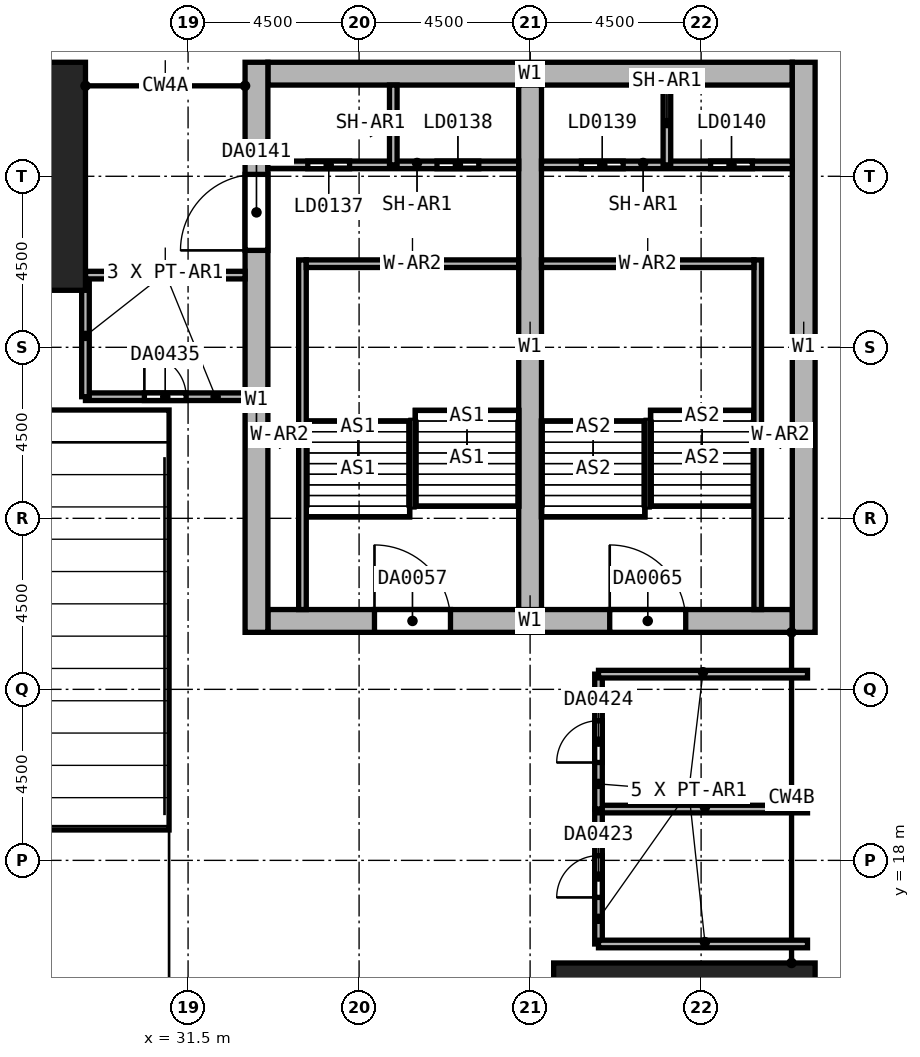
"""IFC4 building model, lengths in metres.
Left out: names, types, materials, properties, quantities, classifications, styles, units other than length and angle.
Written with IfcOpenShell. Run it as: python <this file> out.ifc"""

import sys

from ifc_helpers import new_model, si_unit, direction, frame, frame_2d, origin, origin_2d, place, context, subcontext, project, spatial, rectangle, extrude, element, fill, save


model = new_model("IFC4")
c1 = context("Model", 3, precision=1e-05, world=origin(), true_north=direction((0.0, 1.0)))
c2 = subcontext(c1, "Body", "Model", "MODEL_VIEW")
j1 = project(units=[si_unit("LENGTHUNIT", "METRE"), si_unit("PLANEANGLEUNIT", "RADIAN")], contexts=[c1])
p1 = place(None, origin())
s1 = spatial("IfcSite", under=j1, at=p1, CompositionType="ELEMENT")
p2 = place(p1, origin())
s2 = spatial("IfcBuilding", under=s1, at=p2, CompositionType="ELEMENT")
p3 = place(p2, frame((0.0, 0.0, 31.0)))
s3 = spatial("IfcBuildingStorey", under=s2, at=p3, CompositionType="ELEMENT", Elevation=31.0)
p4 = place(p3, frame((27.0, 36.0, 0.0), z_axis=(0.0, 0.0, 1.0), x_axis=(1.0, 0.0, 0.0)))
e1 = element("IfcColumn", 1, at=p4, inside=s3, PredefinedType="COLUMN", context=c2, shape_type="SweptSolid", body=[
    extrude(rectangle(XDim=3.6, YDim=6.0, at=origin_2d()), origin(), (0.0, 0.0, 1.0), 6.0),
])
p5 = place(p3, frame((44.56, 13.5, 0.0), z_axis=(0.0, 0.0, 1.0), x_axis=(0.0, 1.0, 0.0)))
e2 = element("IfcColumn", 2, at=p5, inside=s3, PredefinedType="COLUMN", context=c2, shape_type="SweptSolid", body=[
    extrude(rectangle(XDim=3.6, YDim=6.88, at=origin_2d()), origin(), (0.0, 0.0, 1.0), 6.0),
])
p6 = place(p3, frame((33.6, 38.7, 0.0), z_axis=(0.0, 0.0, 1.0), x_axis=(1.0, 0.0, 0.0)))
e3 = element("IfcWall", 3, at=p6, inside=s3, PredefinedType="SHEAR", context=c2, shape_type="SweptSolid", body=[
    extrude(rectangle(XDim=13.8, YDim=0.6, at=frame_2d((6.9, 0.0))), origin(), (0.0, 0.0, 1.0), 6.0),
])
p7 = place(p3, frame((33.6, 24.3, 0.0), z_axis=(0.0, 0.0, 1.0), x_axis=(1.0, 0.0, 0.0)))
e4 = element("IfcWall", 4, at=p7, inside=s3, PredefinedType="SHEAR", context=c2, shape_type="SweptSolid", body=[
    extrude(rectangle(XDim=13.8, YDim=0.6, at=frame_2d((6.9, 0.0))), origin(), (0.0, 0.0, 1.0), 6.0),
])
p8 = place(p7, frame((2.805, 0.0, 0.0)))
e5 = element("IfcOpeningElement", 5, at=p8, cuts=e4, PredefinedType="OPENING", context=c2, shape_type="SweptSolid", body=[
    extrude(rectangle(XDim=2.0, YDim=2.4, at=frame_2d((1.0, 1.2))), frame((0.0, 0.3, 0.0), z_axis=(0.0, -1.0, 0.0), x_axis=(1.0, 0.0, 0.0)), (0.0, 0.0, 1.0), 0.6),
])
p9 = place(p7, frame((8.995, 0.0, 0.0)))
e6 = element("IfcOpeningElement", 6, at=p9, cuts=e4, PredefinedType="OPENING", context=c2, shape_type="SweptSolid", body=[
    extrude(rectangle(XDim=2.0, YDim=2.4, at=frame_2d((1.0, 1.2))), frame((0.0, 0.3, 0.0), z_axis=(0.0, -1.0, 0.0), x_axis=(1.0, 0.0, 0.0)), (0.0, 0.0, 1.0), 0.6),
])
p10 = place(p3, frame((33.3, 24.0, 0.0), z_axis=(0.0, 0.0, 1.0), x_axis=(0.0, 1.0, 0.0)))
e7 = element("IfcWall", 7, at=p10, inside=s3, PredefinedType="SHEAR", context=c2, shape_type="SweptSolid", body=[
    extrude(rectangle(XDim=15.0, YDim=0.6, at=frame_2d((7.5, 0.0))), origin(), (0.0, 0.0, 1.0), 6.0),
])
p11 = place(p10, frame((10.05, 0.0, 0.0)))
e8 = element("IfcOpeningElement", 8, at=p11, cuts=e7, PredefinedType="OPENING", context=c2, shape_type="SweptSolid", body=[
    extrude(rectangle(XDim=2.0, YDim=2.4, at=frame_2d((1.0, 1.2))), frame((0.0, 0.3, 0.0), z_axis=(0.0, -1.0, 0.0), x_axis=(1.0, 0.0, 0.0)), (0.0, 0.0, 1.0), 0.6),
])
p12 = place(p3, frame((47.7, 24.0, 0.0), z_axis=(0.0, 0.0, 1.0), x_axis=(0.0, 1.0, 0.0)))
e9 = element("IfcWall", 9, at=p12, inside=s3, PredefinedType="SHEAR", context=c2, shape_type="SweptSolid", body=[
    extrude(rectangle(XDim=15.0, YDim=0.6, at=frame_2d((7.5, 0.0))), origin(), (0.0, 0.0, 1.0), 6.0),
])
p13 = place(p3, frame((40.5, 24.6, 0.0), z_axis=(0.0, 0.0, 1.0), x_axis=(0.0, 1.0, 0.0)))
e10 = element("IfcWall", 10, at=p13, inside=s3, PredefinedType="SHEAR", context=c2, shape_type="SweptSolid", body=[
    extrude(rectangle(XDim=13.8, YDim=0.6, at=frame_2d((6.9, 0.0))), origin(), (0.0, 0.0, 1.0), 6.0),
])
p14 = place(p3, frame((34.51, 24.6, 0.0), z_axis=(0.0, 0.0, 1.0), x_axis=(0.0, 1.0, 0.0)))
e11 = element("IfcWall", 11, at=p14, inside=s3, PredefinedType="SOLIDWALL", context=c2, shape_type="SweptSolid", body=[
    extrude(rectangle(XDim=9.2, YDim=0.2, at=frame_2d((4.6, 0.0))), origin(), (0.0, 0.0, 1.0), 6.0),
])
p15 = place(p3, frame((34.61, 33.7, 0.0), z_axis=(0.0, 0.0, 1.0), x_axis=(1.0, 0.0, 0.0)))
e12 = element("IfcWall", 12, at=p15, inside=s3, PredefinedType="SOLIDWALL", context=c2, shape_type="SweptSolid", body=[
    extrude(rectangle(XDim=5.59, YDim=0.2, at=frame_2d((2.795, 0.0))), origin(), (0.0, 0.0, 1.0), 6.0),
])
p16 = place(p3, frame((46.49, 24.6, 0.0), z_axis=(0.0, 0.0, 1.0), x_axis=(0.0, 1.0, 0.0)))
e13 = element("IfcWall", 13, at=p16, inside=s3, PredefinedType="SOLIDWALL", context=c2, shape_type="SweptSolid", body=[
    extrude(rectangle(XDim=9.2, YDim=0.2, at=frame_2d((4.6, 0.0))), origin(), (0.0, 0.0, 1.0), 6.0),
])
p17 = place(p3, frame((40.8, 33.7, 0.0), z_axis=(0.0, 0.0, 1.0), x_axis=(1.0, 0.0, 0.0)))
e14 = element("IfcWall", 14, at=p17, inside=s3, PredefinedType="SOLIDWALL", context=c2, shape_type="SweptSolid", body=[
    extrude(rectangle(XDim=5.59, YDim=0.2, at=frame_2d((2.795, 0.0))), origin(), (0.0, 0.0, 1.0), 6.0),
])
p18 = place(p3, frame((33.6, 36.3, 0.0), z_axis=(0.0, 0.0, 1.0), x_axis=(1.0, 0.0, 0.0)))
e15 = element("IfcWall", 15, at=p18, inside=s3, PredefinedType="SHEAR", context=c2, shape_type="SweptSolid", body=[
    extrude(rectangle(XDim=6.6, YDim=0.2, at=frame_2d((3.3, 0.0))), origin(), (0.0, 0.0, 1.0), 6.0),
])
p19 = place(p18, frame((1.05, 0.0, 0.0)))
e16 = element("IfcOpeningElement", 16, at=p19, cuts=e15, PredefinedType="OPENING", context=c2, shape_type="SweptSolid", body=[
    extrude(rectangle(XDim=1.1, YDim=2.4, at=frame_2d((0.55, 1.2))), frame((0.0, 0.1, 0.0), z_axis=(0.0, -1.0, 0.0), x_axis=(1.0, 0.0, 0.0)), (0.0, 0.0, 1.0), 0.2),
])
p20 = place(p18, frame((4.45, 0.0, 0.0)))
e17 = element("IfcOpeningElement", 17, at=p20, cuts=e15, PredefinedType="OPENING", context=c2, shape_type="SweptSolid", body=[
    extrude(rectangle(XDim=1.1, YDim=2.4, at=frame_2d((0.55, 1.2))), frame((0.0, 0.1, 0.0), z_axis=(0.0, -1.0, 0.0), x_axis=(1.0, 0.0, 0.0)), (0.0, 0.0, 1.0), 0.2),
])
p21 = place(p3, frame((40.8, 36.3, 0.0), z_axis=(0.0, 0.0, 1.0), x_axis=(1.0, 0.0, 0.0)))
e18 = element("IfcWall", 18, at=p21, inside=s3, PredefinedType="SHEAR", context=c2, shape_type="SweptSolid", body=[
    extrude(rectangle(XDim=6.6, YDim=0.2, at=frame_2d((3.3, 0.0))), origin(), (0.0, 0.0, 1.0), 6.0),
])
p22 = place(p21, frame((1.05, 0.0, 0.0)))
e19 = element("IfcOpeningElement", 19, at=p22, cuts=e18, PredefinedType="OPENING", context=c2, shape_type="SweptSolid", body=[
    extrude(rectangle(XDim=1.1, YDim=2.4, at=frame_2d((0.55, 1.2))), frame((0.0, 0.1, 0.0), z_axis=(0.0, -1.0, 0.0), x_axis=(1.0, 0.0, 0.0)), (0.0, 0.0, 1.0), 0.2),
])
p23 = place(p21, frame((4.45, 0.0, 0.0)))
e20 = element("IfcOpeningElement", 20, at=p23, cuts=e18, PredefinedType="OPENING", context=c2, shape_type="SweptSolid", body=[
    extrude(rectangle(XDim=1.1, YDim=2.4, at=frame_2d((0.55, 1.2))), frame((0.0, 0.1, 0.0), z_axis=(0.0, -1.0, 0.0), x_axis=(1.0, 0.0, 0.0)), (0.0, 0.0, 1.0), 0.2),
])
for number, where, z_axis, x_axis in (
    (21, (36.9, 36.3, 0.0), (0.0, 0.0, 1.0), (0.0, 1.0, 0.0)),
    (22, (44.1, 36.3, 0.0), (0.0, 0.0, 1.0), (0.0, 1.0, 0.0)),
):
    element("IfcWall", number, at=place(p3, frame(where, z_axis=z_axis, x_axis=x_axis)), inside=s3, PredefinedType="SHEAR", context=c2, shape_type="SweptSolid", body=[
        extrude(rectangle(XDim=2.1, YDim=0.2, at=frame_2d((1.05, 0.0))), origin(), (0.0, 0.0, 1.0), 6.0),
    ])
p24 = place(p3, frame((42.3, 15.8, 0.0), z_axis=(0.0, 0.0, 1.0), x_axis=(0.0, 1.0, 0.0)))
e23 = element("IfcWall", 23, at=p24, inside=s3, PredefinedType="PARTITIONING", context=c2, shape_type="SweptSolid", body=[
    extrude(rectangle(XDim=3.55, YDim=0.2, at=frame_2d((1.775, 0.0))), origin(), (0.0, 0.0, 1.0), 5.7),
])
p25 = place(p24, frame((1.225, 0.0, 0.0)))
e24 = element("IfcOpeningElement", 24, at=p25, cuts=e23, PredefinedType="OPENING", context=c2, shape_type="SweptSolid", body=[
    extrude(rectangle(XDim=1.1, YDim=2.4, at=frame_2d((0.55, 1.2))), frame((0.0, 0.1, 0.0), z_axis=(0.0, -1.0, 0.0), x_axis=(1.0, 0.0, 0.0)), (0.0, 0.0, 1.0), 0.2),
])
for number, where, z_axis, x_axis in (
    (25, (42.3, 15.8, 0.0), (0.0, 0.0, 1.0), (1.0, 0.0, 0.0)),
    (26, (42.3, 19.35, 0.0), (0.0, 0.0, 1.0), (1.0, 0.0, 0.0)),
):
    element("IfcWall", number, at=place(p3, frame(where, z_axis=z_axis, x_axis=x_axis)), inside=s3, PredefinedType="PARTITIONING", context=c2, shape_type="SweptSolid", body=[
        extrude(rectangle(XDim=5.5, YDim=0.2, at=frame_2d((2.75, 0.0))), origin(), (0.0, 0.0, 1.0), 5.7),
    ])
p26 = place(p3, frame((42.3, 19.35, 0.0), z_axis=(0.0, 0.0, 1.0), x_axis=(0.0, 1.0, 0.0)))
e27 = element("IfcWall", 27, at=p26, inside=s3, PredefinedType="PARTITIONING", context=c2, shape_type="SweptSolid", body=[
    extrude(rectangle(XDim=3.55, YDim=0.2, at=frame_2d((1.775, 0.0))), origin(), (0.0, 0.0, 1.0), 5.7),
])
p27 = place(p26, frame((1.225, 0.0, 0.0)))
e28 = element("IfcOpeningElement", 28, at=p27, cuts=e27, PredefinedType="OPENING", context=c2, shape_type="SweptSolid", body=[
    extrude(rectangle(XDim=1.1, YDim=2.4, at=frame_2d((0.55, 1.2))), frame((0.0, 0.1, 0.0), z_axis=(0.0, -1.0, 0.0), x_axis=(1.0, 0.0, 0.0)), (0.0, 0.0, 1.0), 0.2),
])
p28 = place(p3, frame((42.3, 22.9, 0.0), z_axis=(0.0, 0.0, 1.0), x_axis=(1.0, 0.0, 0.0)))
e29 = element("IfcWall", 29, at=p28, inside=s3, PredefinedType="PARTITIONING", context=c2, shape_type="SweptSolid", body=[
    extrude(rectangle(XDim=5.5, YDim=0.2, at=frame_2d((2.75, 0.0))), origin(), (0.0, 0.0, 1.0), 5.7),
])
p29 = place(p3, frame((28.8, 30.2, 0.0), z_axis=(0.0, 0.0, 1.0), x_axis=(1.0, 0.0, 0.0)))
e30 = element("IfcWall", 30, at=p29, inside=s3, PredefinedType="PARTITIONING", context=c2, shape_type="SweptSolid", body=[
    extrude(rectangle(XDim=4.2, YDim=0.2, at=frame_2d((2.1, 0.0))), origin(), (0.0, 0.0, 1.0), 5.7),
])
p30 = place(p29, frame((1.55, 0.0, 0.0)))
e31 = element("IfcOpeningElement", 31, at=p30, cuts=e30, PredefinedType="OPENING", context=c2, shape_type="SweptSolid", body=[
    extrude(rectangle(XDim=1.1, YDim=2.4, at=frame_2d((0.55, 1.2))), frame((0.0, 0.1, 0.0), z_axis=(0.0, -1.0, 0.0), x_axis=(1.0, 0.0, 0.0)), (0.0, 0.0, 1.0), 0.2),
])
p31 = place(p3, frame((28.8, 30.2, 0.0), z_axis=(0.0, 0.0, 1.0), x_axis=(0.0, 1.0, 0.0)))
e32 = element("IfcWall", 32, at=p31, inside=s3, PredefinedType="PARTITIONING", context=c2, shape_type="SweptSolid", body=[
    extrude(rectangle(XDim=3.2, YDim=0.2, at=frame_2d((1.6, 0.0))), origin(), (0.0, 0.0, 1.0), 5.7),
])
p32 = place(p3, frame((28.8, 33.4, 0.0), z_axis=(0.0, 0.0, 1.0), x_axis=(1.0, 0.0, 0.0)))
e33 = element("IfcWall", 33, at=p32, inside=s3, PredefinedType="PARTITIONING", context=c2, shape_type="SweptSolid", body=[
    extrude(rectangle(XDim=4.2, YDim=0.2, at=frame_2d((2.1, 0.0))), origin(), (0.0, 0.0, 1.0), 5.7),
])
p33 = place(p8, origin())
e34 = element("IfcDoor", 34, at=p33, inside=s3, OperationType="DOUBLE_DOOR_SINGLE_SWING", PredefinedType="DOOR", context=c2, shape_type="SweptSolid", body=[
    extrude(rectangle(XDim=2.0, YDim=2.4, at=frame_2d((1.0, 1.2))), frame((0.0, 0.025, 0.0), z_axis=(0.0, -1.0, 0.0), x_axis=(1.0, 0.0, 0.0)), (0.0, 0.0, 1.0), 0.05),
])
fill(e5, e34)
p34 = place(p9, origin())
e35 = element("IfcDoor", 35, at=p34, inside=s3, OperationType="DOUBLE_DOOR_SINGLE_SWING", PredefinedType="DOOR", context=c2, shape_type="SweptSolid", body=[
    extrude(rectangle(XDim=2.0, YDim=2.4, at=frame_2d((1.0, 1.2))), frame((0.0, 0.025, 0.0), z_axis=(0.0, -1.0, 0.0), x_axis=(1.0, 0.0, 0.0)), (0.0, 0.0, 1.0), 0.05),
])
fill(e6, e35)
p35 = place(p19, origin())
e36 = element("IfcDoor", 36, at=p35, inside=s3, OperationType="DOUBLE_DOOR_SLIDING", PredefinedType="DOOR", context=c2, shape_type="SweptSolid", body=[
    extrude(rectangle(XDim=1.1, YDim=2.4, at=frame_2d((0.55, 1.2))), frame((0.0, 0.025, 0.0), z_axis=(0.0, -1.0, 0.0), x_axis=(1.0, 0.0, 0.0)), (0.0, 0.0, 1.0), 0.05),
])
fill(e16, e36)
p36 = place(p20, origin())
e37 = element("IfcDoor", 37, at=p36, inside=s3, OperationType="DOUBLE_DOOR_SLIDING", PredefinedType="DOOR", context=c2, shape_type="SweptSolid", body=[
    extrude(rectangle(XDim=1.1, YDim=2.4, at=frame_2d((0.55, 1.2))), frame((0.0, 0.025, 0.0), z_axis=(0.0, -1.0, 0.0), x_axis=(1.0, 0.0, 0.0)), (0.0, 0.0, 1.0), 0.05),
])
fill(e17, e37)
p37 = place(p22, origin())
e38 = element("IfcDoor", 38, at=p37, inside=s3, OperationType="DOUBLE_DOOR_SLIDING", PredefinedType="DOOR", context=c2, shape_type="SweptSolid", body=[
    extrude(rectangle(XDim=1.1, YDim=2.4, at=frame_2d((0.55, 1.2))), frame((0.0, 0.025, 0.0), z_axis=(0.0, -1.0, 0.0), x_axis=(1.0, 0.0, 0.0)), (0.0, 0.0, 1.0), 0.05),
])
fill(e19, e38)
p38 = place(p23, origin())
e39 = element("IfcDoor", 39, at=p38, inside=s3, OperationType="DOUBLE_DOOR_SLIDING", PredefinedType="DOOR", context=c2, shape_type="SweptSolid", body=[
    extrude(rectangle(XDim=1.1, YDim=2.4, at=frame_2d((0.55, 1.2))), frame((0.0, 0.025, 0.0), z_axis=(0.0, -1.0, 0.0), x_axis=(1.0, 0.0, 0.0)), (0.0, 0.0, 1.0), 0.05),
])
fill(e20, e39)
p39 = place(p11, origin())
e40 = element("IfcDoor", 40, at=p39, inside=s3, OperationType="DOUBLE_DOOR_SINGLE_SWING", PredefinedType="DOOR", context=c2, shape_type="SweptSolid", body=[
    extrude(rectangle(XDim=2.0, YDim=2.4, at=frame_2d((1.0, 1.2))), frame((0.0, 0.025, 0.0), z_axis=(0.0, -1.0, 0.0), x_axis=(1.0, 0.0, 0.0)), (0.0, 0.0, 1.0), 0.05),
])
fill(e8, e40)
p40 = place(p25, origin())
e41 = element("IfcDoor", 41, at=p40, inside=s3, OperationType="DOUBLE_DOOR_SINGLE_SWING", PredefinedType="DOOR", context=c2, shape_type="SweptSolid", body=[
    extrude(rectangle(XDim=1.1, YDim=2.4, at=frame_2d((0.55, 1.2))), frame((0.0, 0.025, 0.0), z_axis=(0.0, -1.0, 0.0), x_axis=(1.0, 0.0, 0.0)), (0.0, 0.0, 1.0), 0.05),
])
fill(e24, e41)
p41 = place(p27, origin())
e42 = element("IfcDoor", 42, at=p41, inside=s3, OperationType="DOUBLE_DOOR_SINGLE_SWING", PredefinedType="DOOR", context=c2, shape_type="SweptSolid", body=[
    extrude(rectangle(XDim=1.1, YDim=2.4, at=frame_2d((0.55, 1.2))), frame((0.0, 0.025, 0.0), z_axis=(0.0, -1.0, 0.0), x_axis=(1.0, 0.0, 0.0)), (0.0, 0.0, 1.0), 0.05),
])
fill(e28, e42)
p42 = place(p30, origin())
e43 = element("IfcDoor", 43, at=p42, inside=s3, OperationType="DOUBLE_DOOR_SINGLE_SWING", PredefinedType="DOOR", context=c2, shape_type="SweptSolid", body=[
    extrude(rectangle(XDim=1.1, YDim=2.4, at=frame_2d((0.55, 1.2))), frame((0.0, 0.025, 0.0), z_axis=(0.0, -1.0, 0.0), x_axis=(1.0, 0.0, 0.0)), (0.0, 0.0, 1.0), 0.05),
])
fill(e31, e43)
save(model, sys.argv[1])
